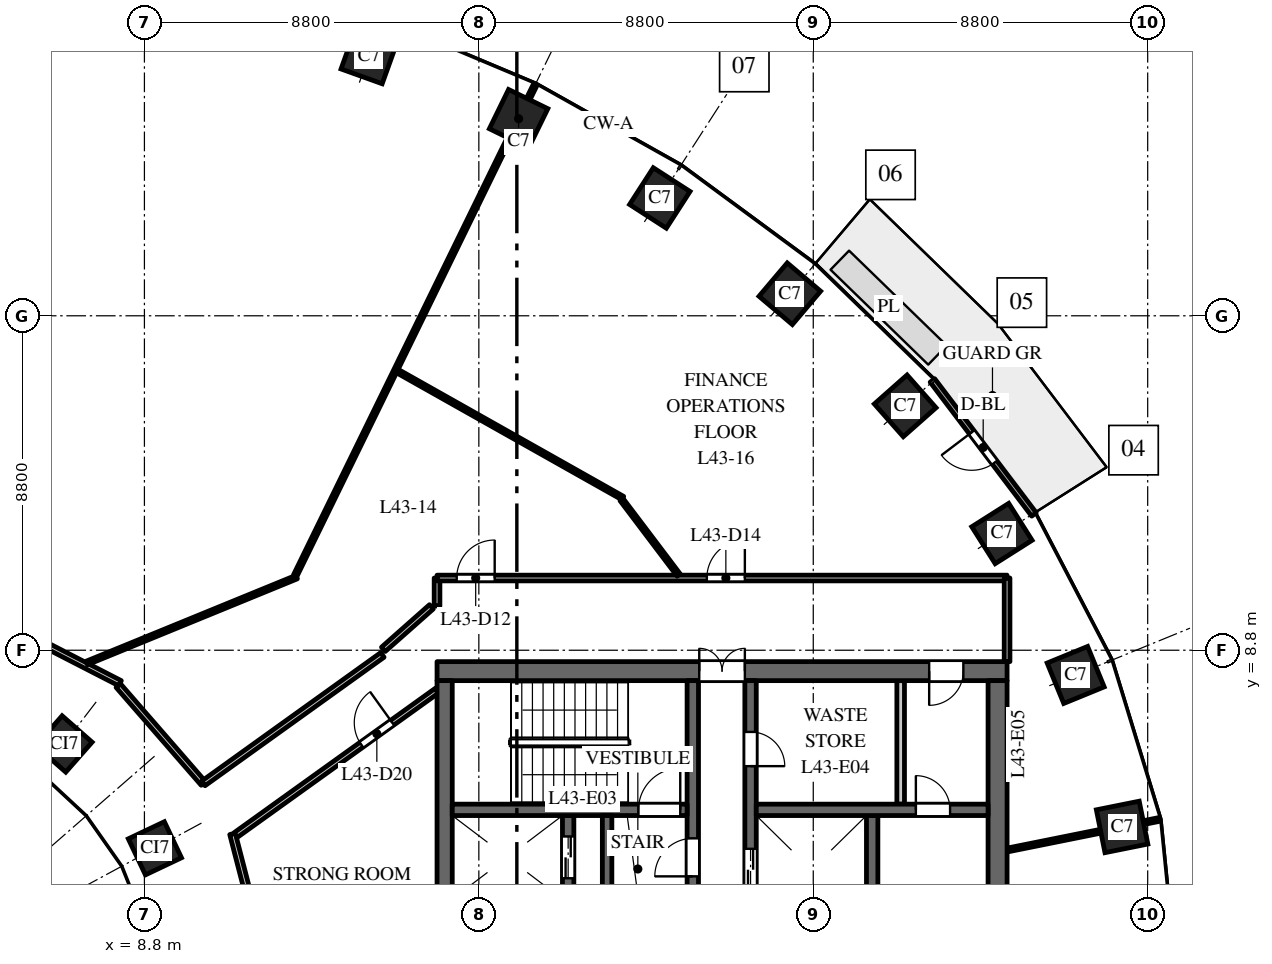
"""IFC4 building model, lengths in metres.
Left out: names, types, materials, properties, quantities, classifications, styles, units other than length and angle.
Written with IfcOpenShell. Run it as: python <this file> out.ifc"""

import sys

from ifc_helpers import new_model, si_unit, direction, frame, frame_2d, origin, origin_2d, place, context, subcontext, project, spatial, rectangle, extrude, element, fill, save


model = new_model("IFC4")
c1 = context("Model", 3, precision=1e-05, world=origin(), true_north=direction((0.0, 1.0)))
c2 = subcontext(c1, "Body", "Model", "MODEL_VIEW")
j1 = project(units=[si_unit("LENGTHUNIT", "METRE"), si_unit("PLANEANGLEUNIT", "RADIAN")], contexts=[c1])
p1 = place(None, origin())
s1 = spatial("IfcSite", under=j1, at=p1, CompositionType="ELEMENT")
p2 = place(p1, origin())
s2 = spatial("IfcBuilding", under=s1, at=p2, CompositionType="ELEMENT")
p3 = place(p2, frame((0.0, 0.0, 186.0)))
s3 = spatial("IfcBuildingStorey", under=s2, at=p3, CompositionType="ELEMENT", Elevation=186.0)
for number, where, z_axis, x_axis in (
    (1, (34.527, 4.151, 0.0), (0.0, 0.0, 1.0), (-0.197, 0.98, 0.0)),
    (2, (33.305, 8.149, 0.0), (0.0, 0.0, 1.0), (-0.379, 0.925, 0.0)),
    (3, (31.365, 11.871, 0.0), (0.0, 0.0, 1.0), (-0.535, 0.845, 0.0)),
    (4, (28.819, 15.23, 0.0), (0.0, 0.0, 1.0), (-0.663, 0.749, 0.0)),
    (5, (25.783, 18.18, 0.0), (0.0, 0.0, 1.0), (-0.763, 0.646, 0.0)),
    (6, (22.362, 20.7, 0.0), (0.0, 0.0, 1.0), (-0.84, 0.542, 0.0)),
    (7, (18.646, 22.785, 0.0), (0.0, 0.0, 1.0), (-0.898, 0.439, 0.0)),
    (8, (14.709, 24.441, 0.0), (0.0, 0.0, 1.0), (-0.941, 0.338, 0.0)),
):
    element("IfcColumn", number, at=place(p3, frame(where, z_axis=z_axis, x_axis=x_axis)), inside=s3, PredefinedType="COLUMN", context=c2, shape_type="SweptSolid", body=[
        extrude(rectangle(XDim=1.15, YDim=1.15, at=origin_2d()), origin(), (0.0, 0.0, 1.0), 4.0),
    ])
for number, where, z_axis, x_axis in (
    (9, (9.076, 3.588, 0.0), (0.0, 0.0, 1.0), (-0.429, 0.903, 0.0)),
    (10, (6.682, 6.334, 0.0), (0.0, 0.0, 1.0), (-0.751, 0.66, 0.0)),
):
    element("IfcColumn", number, at=place(p3, frame(where, z_axis=z_axis, x_axis=x_axis)), inside=s3, PredefinedType="COLUMN", context=c2, shape_type="SweptSolid", body=[
        extrude(rectangle(XDim=1.05, YDim=1.05, at=origin_2d()), origin(), (0.0, 0.0, 1.0), 4.0),
    ])
p4 = place(p3, frame((16.5, 8.25, 0.0), z_axis=(0.0, 0.0, 1.0), x_axis=(1.0, 0.0, 0.0)))
e11 = element("IfcWall", 11, at=p4, inside=s3, PredefinedType="SHEAR", context=c2, shape_type="SweptSolid", body=[
    extrude(rectangle(XDim=15.0, YDim=0.5, at=frame_2d((7.5, 0.0))), origin(), (0.0, 0.0, 1.0), 3.7),
])
p5 = place(p4, frame((6.9, 0.0, 0.0)))
e12 = element("IfcOpeningElement", 12, at=p5, cuts=e11, PredefinedType="OPENING", context=c2, shape_type="SweptSolid", body=[
    extrude(rectangle(XDim=1.2, YDim=2.1, at=frame_2d((0.6, 1.05))), frame((0.0, 0.26, 0.0), z_axis=(0.0, -1.0, 0.0), x_axis=(1.0, 0.0, 0.0)), (0.0, 0.0, 1.0), 0.52),
])
p6 = place(p4, frame((12.95, 0.0, 0.0)))
e13 = element("IfcOpeningElement", 13, at=p6, cuts=e11, PredefinedType="OPENING", context=c2, shape_type="SweptSolid", body=[
    extrude(rectangle(XDim=0.9, YDim=2.1, at=frame_2d((0.45, 1.05))), frame((0.0, 0.26, 0.0), z_axis=(0.0, -1.0, 0.0), x_axis=(1.0, 0.0, 0.0)), (0.0, 0.0, 1.0), 0.52),
])
p7 = place(p3, frame((27.95, -4.45, 0.0), z_axis=(0.0, 0.0, 1.0), x_axis=(0.0, 1.0, 0.0)))
e14 = element("IfcWall", 14, at=p7, inside=s3, PredefinedType="SHEAR", context=c2, shape_type="SweptSolid", body=[
    extrude(rectangle(XDim=8.9, YDim=0.3, at=frame_2d((4.45, 0.0))), origin(), (0.0, 0.0, 1.0), 3.7),
])
p8 = place(p3, frame((19.95, -4.45, 0.0), z_axis=(0.0, 0.0, 1.0), x_axis=(0.0, 1.0, 0.0)))
e15 = element("IfcWall", 15, at=p8, inside=s3, PredefinedType="SHEAR", context=c2, shape_type="SweptSolid", body=[
    extrude(rectangle(XDim=8.9, YDim=0.3, at=frame_2d((4.45, 0.0))), origin(), (0.0, 0.0, 1.0), 3.7),
])
p9 = place(p8, frame((0.775, 0.0, 0.0)))
e16 = element("IfcOpeningElement", 16, at=p9, cuts=e15, PredefinedType="OPENING", context=c2, shape_type="SweptSolid", body=[
    extrude(rectangle(XDim=1.2, YDim=2.1, at=frame_2d((0.6, 1.05))), frame((0.0, 0.16, 0.0), z_axis=(0.0, -1.0, 0.0), x_axis=(1.0, 0.0, 0.0)), (0.0, 0.0, 1.0), 0.32),
])
p10 = place(p8, frame((4.675, 0.0, 0.0)))
e17 = element("IfcOpeningElement", 17, at=p10, cuts=e15, PredefinedType="OPENING", context=c2, shape_type="SweptSolid", body=[
    extrude(rectangle(XDim=1.1, YDim=2.1, at=frame_2d((0.55, 1.05))), frame((0.0, 0.16, 0.0), z_axis=(0.0, -1.0, 0.0), x_axis=(1.0, 0.0, 0.0)), (0.0, 0.0, 1.0), 0.32),
])
p11 = place(p8, frame((7.25, 0.0, 0.0)))
e18 = element("IfcOpeningElement", 18, at=p11, cuts=e15, PredefinedType="OPENING", context=c2, shape_type="SweptSolid", body=[
    extrude(rectangle(XDim=1.1, YDim=2.1, at=frame_2d((0.55, 1.05))), frame((0.0, 0.16, 0.0), z_axis=(0.0, -1.0, 0.0), x_axis=(1.0, 0.0, 0.0)), (0.0, 0.0, 1.0), 0.32),
])
p12 = place(p3, frame((24.75, -8.0, 0.0), z_axis=(0.0, 0.0, 1.0), x_axis=(0.0, 1.0, 0.0)))
e19 = element("IfcWall", 19, at=p12, inside=s3, PredefinedType="SHEAR", context=c2, shape_type="SweptSolid", body=[
    extrude(rectangle(XDim=16.0, YDim=0.3, at=frame_2d((8.0, 0.0))), origin(), (0.0, 0.0, 1.0), 3.7),
])
p13 = place(p12, frame((4.425, 0.0, 0.0)))
e20 = element("IfcOpeningElement", 20, at=p13, cuts=e19, PredefinedType="OPENING", context=c2, shape_type="SweptSolid", body=[
    extrude(rectangle(XDim=1.1, YDim=2.1, at=frame_2d((0.55, 1.05))), frame((0.0, 0.16, 0.0), z_axis=(0.0, -1.0, 0.0), x_axis=(1.0, 0.0, 0.0)), (0.0, 0.0, 1.0), 0.32),
])
p14 = place(p12, frame((7.45, 0.0, 0.0)))
e21 = element("IfcOpeningElement", 21, at=p14, cuts=e19, PredefinedType="OPENING", context=c2, shape_type="SweptSolid", body=[
    extrude(rectangle(XDim=1.1, YDim=2.1, at=frame_2d((0.55, 1.05))), frame((0.0, 0.16, 0.0), z_axis=(0.0, -1.0, 0.0), x_axis=(1.0, 0.0, 0.0)), (0.0, 0.0, 1.0), 0.32),
])
p15 = place(p12, frame((10.475, 0.0, 0.0)))
e22 = element("IfcOpeningElement", 22, at=p15, cuts=e19, PredefinedType="OPENING", context=c2, shape_type="SweptSolid", body=[
    extrude(rectangle(XDim=1.1, YDim=2.1, at=frame_2d((0.55, 1.05))), frame((0.0, 0.16, 0.0), z_axis=(0.0, -1.0, 0.0), x_axis=(1.0, 0.0, 0.0)), (0.0, 0.0, 1.0), 0.32),
])
p16 = place(p12, frame((13.75, 0.0, 0.0)))
e23 = element("IfcOpeningElement", 23, at=p16, cuts=e19, PredefinedType="OPENING", context=c2, shape_type="SweptSolid", body=[
    extrude(rectangle(XDim=0.9, YDim=2.1, at=frame_2d((0.45, 1.05))), frame((0.0, 0.16, 0.0), z_axis=(0.0, -1.0, 0.0), x_axis=(1.0, 0.0, 0.0)), (0.0, 0.0, 1.0), 0.32),
])
p17 = place(p12, frame((1.975, 0.0, 0.0)))
e24 = element("IfcOpeningElement", 24, at=p17, cuts=e19, PredefinedType="OPENING", context=c2, shape_type="SweptSolid", body=[
    extrude(rectangle(XDim=0.9, YDim=2.1, at=frame_2d((0.45, 1.05))), frame((0.0, 0.16, 0.0), z_axis=(0.0, -1.0, 0.0), x_axis=(1.0, 0.0, 0.0)), (0.0, 0.0, 1.0), 0.32),
])
p18 = place(p12, frame((0.35, 0.0, 0.0)))
e25 = element("IfcOpeningElement", 25, at=p18, cuts=e19, PredefinedType="OPENING", context=c2, shape_type="SweptSolid", body=[
    extrude(rectangle(XDim=0.9, YDim=2.1, at=frame_2d((0.45, 1.05))), frame((0.0, 0.16, 0.0), z_axis=(0.0, -1.0, 0.0), x_axis=(1.0, 0.0, 0.0)), (0.0, 0.0, 1.0), 0.32),
])
p19 = place(p3, frame((16.7, -8.0, 0.0), z_axis=(0.0, 0.0, 1.0), x_axis=(0.0, 1.0, 0.0)))
e26 = element("IfcWall", 26, at=p19, inside=s3, PredefinedType="SHEAR", context=c2, shape_type="SweptSolid", body=[
    extrude(rectangle(XDim=16.0, YDim=0.4, at=frame_2d((8.0, 0.0))), origin(), (0.0, 0.0, 1.0), 3.7),
])
p20 = place(p3, frame((31.25, -8.0, 0.0), z_axis=(0.0, 0.0, 1.0), x_axis=(0.0, 1.0, 0.0)))
e27 = element("IfcWall", 27, at=p20, inside=s3, PredefinedType="SHEAR", context=c2, shape_type="SweptSolid", body=[
    extrude(rectangle(XDim=16.0, YDim=0.5, at=frame_2d((8.0, 0.0))), origin(), (0.0, 0.0, 1.0), 3.7),
])
p21 = place(p3, frame((24.9, 4.6, 0.0), z_axis=(0.0, 0.0, 1.0), x_axis=(1.0, 0.0, 0.0)))
e28 = element("IfcWall", 28, at=p21, inside=s3, PredefinedType="SHEAR", context=c2, shape_type="SweptSolid", body=[
    extrude(rectangle(XDim=6.1, YDim=0.3, at=frame_2d((3.05, 0.0))), origin(), (0.0, 0.0, 1.0), 3.7),
])
p22 = place(p21, frame((4.2, 0.0, 0.0)))
e29 = element("IfcOpeningElement", 29, at=p22, cuts=e28, PredefinedType="OPENING", context=c2, shape_type="SweptSolid", body=[
    extrude(rectangle(XDim=0.9, YDim=2.1, at=frame_2d((0.45, 1.05))), frame((0.0, 0.16, 0.0), z_axis=(0.0, -1.0, 0.0), x_axis=(1.0, 0.0, 0.0)), (0.0, 0.0, 1.0), 0.32),
])
p23 = place(p3, frame((28.7, 4.75, 0.0), z_axis=(0.0, 0.0, 1.0), x_axis=(0.0, 1.0, 0.0)))
e30 = element("IfcWall", 30, at=p23, inside=s3, PredefinedType="PARTITIONING", context=c2, shape_type="SweptSolid", body=[
    extrude(rectangle(XDim=3.25, YDim=0.2, at=frame_2d((1.625, 0.0))), origin(), (0.0, 0.0, 1.0), 3.7),
])
p24 = place(p3, frame((23.23, 2.25, 0.0), z_axis=(0.0, 0.0, 1.0), x_axis=(0.0, 1.0, 0.0)))
e31 = element("IfcWall", 31, at=p24, inside=s3, PredefinedType="SHEAR", context=c2, shape_type="SweptSolid", body=[
    extrude(rectangle(XDim=5.75, YDim=0.3, at=frame_2d((2.875, 0.0))), origin(), (0.0, 0.0, 1.0), 3.7),
])
p25 = place(p24, frame((0.6, 0.0, 0.0)))
e32 = element("IfcOpeningElement", 32, at=p25, cuts=e31, PredefinedType="OPENING", context=c2, shape_type="SweptSolid", body=[
    extrude(rectangle(XDim=1.0, YDim=2.1, at=frame_2d((0.5, 1.05))), frame((0.0, 0.16, 0.0), z_axis=(0.0, -1.0, 0.0), x_axis=(1.0, 0.0, 0.0)), (0.0, 0.0, 1.0), 0.32),
])
p26 = place(p3, frame((16.9, 4.6, 0.0), z_axis=(0.0, 0.0, 1.0), x_axis=(1.0, 0.0, 0.0)))
e33 = element("IfcWall", 33, at=p26, inside=s3, PredefinedType="SHEAR", context=c2, shape_type="SweptSolid", body=[
    extrude(rectangle(XDim=6.18, YDim=0.3, at=frame_2d((3.09, 0.0))), origin(), (0.0, 0.0, 1.0), 3.7),
])
p27 = place(p26, frame((4.9, 0.0, 0.0)))
e34 = element("IfcOpeningElement", 34, at=p27, cuts=e33, PredefinedType="OPENING", context=c2, shape_type="SweptSolid", body=[
    extrude(rectangle(XDim=1.1, YDim=2.1, at=frame_2d((0.55, 1.05))), frame((0.0, 0.16, 0.0), z_axis=(0.0, -1.0, 0.0), x_axis=(1.0, 0.0, 0.0)), (0.0, 0.0, 1.0), 0.32),
])
p28 = place(p3, frame((20.975, 2.25, 0.0), z_axis=(0.0, 0.0, 1.0), x_axis=(0.0, 1.0, 0.0)))
e35 = element("IfcWall", 35, at=p28, inside=s3, PredefinedType="SHEAR", context=c2, shape_type="SweptSolid", body=[
    extrude(rectangle(XDim=2.2, YDim=0.25, at=frame_2d((1.1, 0.0))), origin(), (0.0, 0.0, 1.0), 3.7),
])
p29 = place(p3, frame((32.208, 12.374, 0.0), z_axis=(0.0, 0.0, 1.0), x_axis=(-0.604045763106, 0.796949632081, 0.0)))
e36 = element("IfcWall", 36, at=p29, inside=s3, PredefinedType="STANDARD", context=c2, shape_type="SweptSolid", body=[
    extrude(rectangle(XDim=4.423, YDim=0.15, at=frame_2d((2.212, 0.0))), origin(), (0.0, 0.0, 1.0), 3.7),
])
p30 = place(p29, frame((1.712, 0.0, 0.0)))
e37 = element("IfcOpeningElement", 37, at=p30, cuts=e36, PredefinedType="OPENING", context=c2, shape_type="SweptSolid", body=[
    extrude(rectangle(XDim=1.0, YDim=2.4, at=frame_2d((0.5, 1.2))), frame((0.0, 0.085, 0.0), z_axis=(0.0, -1.0, 0.0), x_axis=(1.0, 0.0, 0.0)), (0.0, 0.0, 1.0), 0.17),
])
p31 = place(p3, frame((4.337, 9.896, 0.0), z_axis=(0.0, 0.0, 1.0), x_axis=(0.889382211946, -0.457164391739, 0.0)))
e38 = element("IfcWall", 38, at=p31, inside=s3, PredefinedType="PARTITIONING", context=c2, shape_type="SweptSolid", body=[
    extrude(rectangle(XDim=4.296, YDim=0.15, at=frame_2d((2.148, 0.0))), origin(), (0.0, 0.0, 1.0), 2.85),
])
p32 = place(p3, frame((7.283, 8.464, 0.0), z_axis=(0.0, 0.0, 1.0), x_axis=(0.925453089517, 0.378862216516, 0.0)))
e39 = element("IfcWall", 39, at=p32, inside=s3, PredefinedType="PARTITIONING", context=c2, shape_type="SweptSolid", body=[
    extrude(rectangle(XDim=5.968, YDim=0.1, at=frame_2d((2.984, 0.0))), origin(), (0.0, 0.0, 1.0), 3.7),
])
p33 = place(p3, frame((8.111, 7.871, 0.0), z_axis=(0.0, 0.0, 1.0), x_axis=(0.656293818527, -0.754505416656, 0.0)))
e40 = element("IfcWall", 40, at=p33, inside=s3, PredefinedType="PARTITIONING", context=c2, shape_type="SweptSolid", body=[
    extrude(rectangle(XDim=3.413, YDim=0.15, at=frame_2d((1.707, 0.0))), origin(), (0.0, 0.0, 1.0), 2.75),
])
p34 = place(p3, frame((10.351, 5.296, 0.0), z_axis=(0.0, 0.0, 1.0), x_axis=(0.812494026232, 0.582969516645, 0.0)))
e41 = element("IfcWall", 41, at=p34, inside=s3, PredefinedType="PARTITIONING", context=c2, shape_type="SweptSolid", body=[
    extrude(rectangle(XDim=5.798, YDim=0.15, at=frame_2d((2.899, 0.0))), origin(), (0.0, 0.0, 1.0), 2.75),
])
p35 = place(p3, frame((11.118, 3.969, 0.0), z_axis=(0.0, 0.0, 1.0), x_axis=(0.250695837289, -0.968065905384, 0.0)))
e42 = element("IfcWall", 42, at=p35, inside=s3, PredefinedType="PARTITIONING", context=c2, shape_type="SweptSolid", body=[
    extrude(rectangle(XDim=3.945, YDim=0.15, at=frame_2d((1.973, 0.0))), origin(), (0.0, 0.0, 1.0), 3.7),
])
p36 = place(p3, frame((11.203, 3.938, 0.0), z_axis=(0.0, 0.0, 1.0), x_axis=(0.812471543061, 0.583000850528, 0.0)))
e43 = element("IfcWall", 43, at=p36, inside=s3, PredefinedType="PARTITIONING", context=c2, shape_type="SweptSolid", body=[
    extrude(rectangle(XDim=6.52, YDim=0.15, at=frame_2d((3.26, 0.0))), origin(), (0.0, 0.0, 1.0), 3.7),
])
p37 = place(p36, frame((4.07, 0.0, 0.0)))
e44 = element("IfcOpeningElement", 44, at=p37, cuts=e43, PredefinedType="OPENING", context=c2, shape_type="SweptSolid", body=[
    extrude(rectangle(XDim=1.0, YDim=2.1, at=frame_2d((0.5, 1.05))), frame((0.0, 0.085, 0.0), z_axis=(0.0, -1.0, 0.0), x_axis=(1.0, 0.0, 0.0)), (0.0, 0.0, 1.0), 0.17),
])
p38 = place(p3, frame((12.769, 10.765, 0.0), z_axis=(0.0, 0.0, 1.0), x_axis=(0.439230835686, 0.898374238824, 0.0)))
e45 = element("IfcWall", 45, at=p38, inside=s3, PredefinedType="PARTITIONING", context=c2, shape_type="SweptSolid", body=[
    extrude(rectangle(XDim=14.382, YDim=0.1, at=frame_2d((7.191, 0.0))), origin(), (0.0, 0.0, 1.0), 2.9),
])
p39 = place(p3, frame((15.456, 16.145, 0.0), z_axis=(0.0, 0.0, 1.0), x_axis=(0.871239204441, -0.490858685006, 0.0)))
e46 = element("IfcWall", 46, at=p39, inside=s3, PredefinedType="PARTITIONING", context=c2, shape_type="SweptSolid", body=[
    extrude(rectangle(XDim=6.809, YDim=0.1, at=frame_2d((3.404, 0.0))), origin(), (0.0, 0.0, 1.0), 3.7),
])
p40 = place(p3, frame((16.5, 9.964, 0.0), z_axis=(0.0, 0.0, 1.0), x_axis=(0.0, 1.0, 0.0)))
e47 = element("IfcWall", 47, at=p40, inside=s3, PredefinedType="PARTITIONING", context=c2, shape_type="SweptSolid", body=[
    extrude(rectangle(XDim=0.736, YDim=0.15, at=frame_2d((0.368, 0.0))), origin(), (0.0, 0.0, 1.0), 3.7),
])
p41 = place(p3, frame((16.5, 10.7, 0.0), z_axis=(0.0, 0.0, 1.0), x_axis=(1.0, 0.0, 0.0)))
e48 = element("IfcWall", 48, at=p41, inside=s3, PredefinedType="PARTITIONING", context=c2, shape_type="SweptSolid", body=[
    extrude(rectangle(XDim=15.0, YDim=0.15, at=frame_2d((7.5, 0.0))), origin(), (0.0, 0.0, 1.0), 2.75),
])
p42 = place(p41, frame((0.517, 0.0, 0.0)))
e49 = element("IfcOpeningElement", 49, at=p42, cuts=e48, PredefinedType="OPENING", context=c2, shape_type="SweptSolid", body=[
    extrude(rectangle(XDim=1.0, YDim=2.1, at=frame_2d((0.5, 1.05))), frame((0.0, 0.085, 0.0), z_axis=(0.0, -1.0, 0.0), x_axis=(1.0, 0.0, 0.0)), (0.0, 0.0, 1.0), 0.17),
])
p43 = place(p41, frame((7.1, 0.0, 0.0)))
e50 = element("IfcOpeningElement", 50, at=p43, cuts=e48, PredefinedType="OPENING", context=c2, shape_type="SweptSolid", body=[
    extrude(rectangle(XDim=1.0, YDim=2.1, at=frame_2d((0.5, 1.05))), frame((0.0, 0.085, 0.0), z_axis=(0.0, -1.0, 0.0), x_axis=(1.0, 0.0, 0.0)), (0.0, 0.0, 1.0), 0.17),
])
p44 = place(p3, frame((21.355, 12.765, 0.0), z_axis=(0.0, 0.0, 1.0), x_axis=(0.603287715996, -0.797523624558, 0.0)))
e51 = element("IfcWall", 51, at=p44, inside=s3, PredefinedType="PARTITIONING", context=c2, shape_type="SweptSolid", body=[
    extrude(rectangle(XDim=2.491, YDim=0.1, at=frame_2d((1.246, 0.0))), origin(), (0.0, 0.0, 1.0), 2.75),
])
p45 = place(p3, frame((31.5, 3.542, 0.0), z_axis=(0.0, 0.0, 1.0), x_axis=(0.980357474535, 0.197228857227, 0.0)))
e52 = element("IfcWall", 52, at=p45, inside=s3, PredefinedType="PARTITIONING", context=c2, shape_type="SweptSolid", body=[
    extrude(rectangle(XDim=4.092, YDim=0.1, at=frame_2d((2.046, 0.0))), origin(), (0.0, 0.0, 1.0), 2.9),
])
p46 = place(p3, frame((31.5, 8.5, 0.0), z_axis=(0.0, 0.0, 1.0), x_axis=(0.0, 1.0, 0.0)))
e53 = element("IfcWall", 53, at=p46, inside=s3, PredefinedType="PARTITIONING", context=c2, shape_type="SweptSolid", body=[
    extrude(rectangle(XDim=2.2, YDim=0.15, at=frame_2d((1.1, 0.0))), origin(), (0.0, 0.0, 1.0), 2.9),
])
p47 = place(p3, frame((15.088, 8.824, 0.0), z_axis=(0.0, 0.0, 1.0), x_axis=(0.749107006374, 0.662449011624, 0.0)))
e54 = element("IfcWall", 54, at=p47, inside=s3, PredefinedType="PARTITIONING", context=c2, shape_type="SweptSolid", body=[
    extrude(rectangle(XDim=1.688, YDim=0.15, at=frame_2d((0.844, 0.0))), origin(), (0.0, 0.0, 1.0), 3.7),
])
p48 = place(p11, origin())
e55 = element("IfcDoor", 55, at=p48, inside=s3, OperationType="DOUBLE_DOOR_SLIDING", PredefinedType="DOOR", context=c2, shape_type="SweptSolid", body=[
    extrude(rectangle(XDim=1.1, YDim=2.1, at=frame_2d((0.55, 1.05))), frame((0.0, 0.025, 0.0), z_axis=(0.0, -1.0, 0.0), x_axis=(1.0, 0.0, 0.0)), (0.0, 0.0, 1.0), 0.05),
])
fill(e18, e55)
p49 = place(p15, origin())
e56 = element("IfcDoor", 56, at=p49, inside=s3, OperationType="DOUBLE_DOOR_SLIDING", PredefinedType="DOOR", context=c2, shape_type="SweptSolid", body=[
    extrude(rectangle(XDim=1.1, YDim=2.1, at=frame_2d((0.55, 1.05))), frame((0.0, 0.025, 0.0), z_axis=(0.0, -1.0, 0.0), x_axis=(1.0, 0.0, 0.0)), (0.0, 0.0, 1.0), 0.05),
])
fill(e22, e56)
p50 = place(p27, origin())
e57 = element("IfcDoor", 57, at=p50, inside=s3, OperationType="SINGLE_SWING_LEFT", PredefinedType="DOOR", context=c2, shape_type="SweptSolid", body=[
    extrude(rectangle(XDim=1.1, YDim=2.1, at=frame_2d((0.55, 1.05))), frame((0.0, 0.025, 0.0), z_axis=(0.0, -1.0, 0.0), x_axis=(1.0, 0.0, 0.0)), (0.0, 0.0, 1.0), 0.05),
])
fill(e34, e57)
p51 = place(p25, origin())
e58 = element("IfcDoor", 58, at=p51, inside=s3, OperationType="SINGLE_SWING_RIGHT", PredefinedType="DOOR", context=c2, shape_type="SweptSolid", body=[
    extrude(rectangle(XDim=1.0, YDim=2.1, at=frame_2d((0.5, 1.05))), frame((0.0, 0.025, 0.0), z_axis=(0.0, -1.0, 0.0), x_axis=(1.0, 0.0, 0.0)), (0.0, 0.0, 1.0), 0.05),
])
fill(e32, e58)
p52 = place(p5, origin())
e59 = element("IfcDoor", 59, at=p52, inside=s3, OperationType="DOUBLE_DOOR_DOUBLE_SWING", PredefinedType="DOOR", context=c2, shape_type="SweptSolid", body=[
    extrude(rectangle(XDim=1.2, YDim=2.1, at=frame_2d((0.6, 1.05))), frame((0.0, 0.025, 0.0), z_axis=(0.0, -1.0, 0.0), x_axis=(1.0, 0.0, 0.0)), (0.0, 0.0, 1.0), 0.05),
])
fill(e12, e59)
p53 = place(p16, origin())
e60 = element("IfcDoor", 60, at=p53, inside=s3, OperationType="SINGLE_SWING_LEFT", PredefinedType="DOOR", context=c2, shape_type="SweptSolid", body=[
    extrude(rectangle(XDim=0.9, YDim=2.1, at=frame_2d((0.45, 1.05))), frame((0.0, 0.025, 0.0), z_axis=(0.0, -1.0, 0.0), x_axis=(1.0, 0.0, 0.0)), (0.0, 0.0, 1.0), 0.05),
])
fill(e23, e60)
p54 = place(p6, origin())
e61 = element("IfcDoor", 61, at=p54, inside=s3, OperationType="SINGLE_SWING_LEFT", PredefinedType="DOOR", context=c2, shape_type="SweptSolid", body=[
    extrude(rectangle(XDim=0.9, YDim=2.1, at=frame_2d((0.45, 1.05))), frame((0.0, 0.025, 0.0), z_axis=(0.0, -1.0, 0.0), x_axis=(1.0, 0.0, 0.0)), (0.0, 0.0, 1.0), 0.05),
])
fill(e13, e61)
p55 = place(p22, origin())
e62 = element("IfcDoor", 62, at=p55, inside=s3, OperationType="SINGLE_SWING_RIGHT", PredefinedType="DOOR", context=c2, shape_type="SweptSolid", body=[
    extrude(rectangle(XDim=0.9, YDim=2.1, at=frame_2d((0.45, 1.05))), frame((0.0, 0.025, 0.0), z_axis=(0.0, -1.0, 0.0), x_axis=(1.0, 0.0, 0.0)), (0.0, 0.0, 1.0), 0.05),
])
fill(e29, e62)
p56 = place(p30, origin())
e63 = element("IfcDoor", 63, at=p56, inside=s3, OperationType="SINGLE_SWING_RIGHT", PredefinedType="DOOR", context=c2, shape_type="SweptSolid", body=[
    extrude(rectangle(XDim=1.0, YDim=2.4, at=frame_2d((0.5, 1.2))), frame((0.0, 0.025, 0.0), z_axis=(0.0, -1.0, 0.0), x_axis=(1.0, 0.0, 0.0)), (0.0, 0.0, 1.0), 0.05),
])
fill(e37, e63)
p57 = place(p42, origin())
e64 = element("IfcDoor", 64, at=p57, inside=s3, OperationType="SINGLE_SWING_RIGHT", PredefinedType="DOOR", context=c2, shape_type="SweptSolid", body=[
    extrude(rectangle(XDim=1.0, YDim=2.1, at=frame_2d((0.5, 1.05))), frame((0.0, 0.025, 0.0), z_axis=(0.0, -1.0, 0.0), x_axis=(1.0, 0.0, 0.0)), (0.0, 0.0, 1.0), 0.05),
])
fill(e49, e64)
p58 = place(p43, origin())
e65 = element("IfcDoor", 65, at=p58, inside=s3, OperationType="SINGLE_SWING_RIGHT", PredefinedType="DOOR", context=c2, shape_type="SweptSolid", body=[
    extrude(rectangle(XDim=1.0, YDim=2.1, at=frame_2d((0.5, 1.05))), frame((0.0, 0.025, 0.0), z_axis=(0.0, -1.0, 0.0), x_axis=(1.0, 0.0, 0.0)), (0.0, 0.0, 1.0), 0.05),
])
fill(e50, e65)
p59 = place(p37, origin())
e66 = element("IfcDoor", 66, at=p59, inside=s3, OperationType="SINGLE_SWING_RIGHT", PredefinedType="DOOR", context=c2, shape_type="SweptSolid", body=[
    extrude(rectangle(XDim=1.0, YDim=2.1, at=frame_2d((0.5, 1.05))), frame((0.0, 0.025, 0.0), z_axis=(0.0, -1.0, 0.0), x_axis=(1.0, 0.0, 0.0)), (0.0, 0.0, 1.0), 0.05),
])
fill(e44, e66)
save(model, sys.argv[1])
